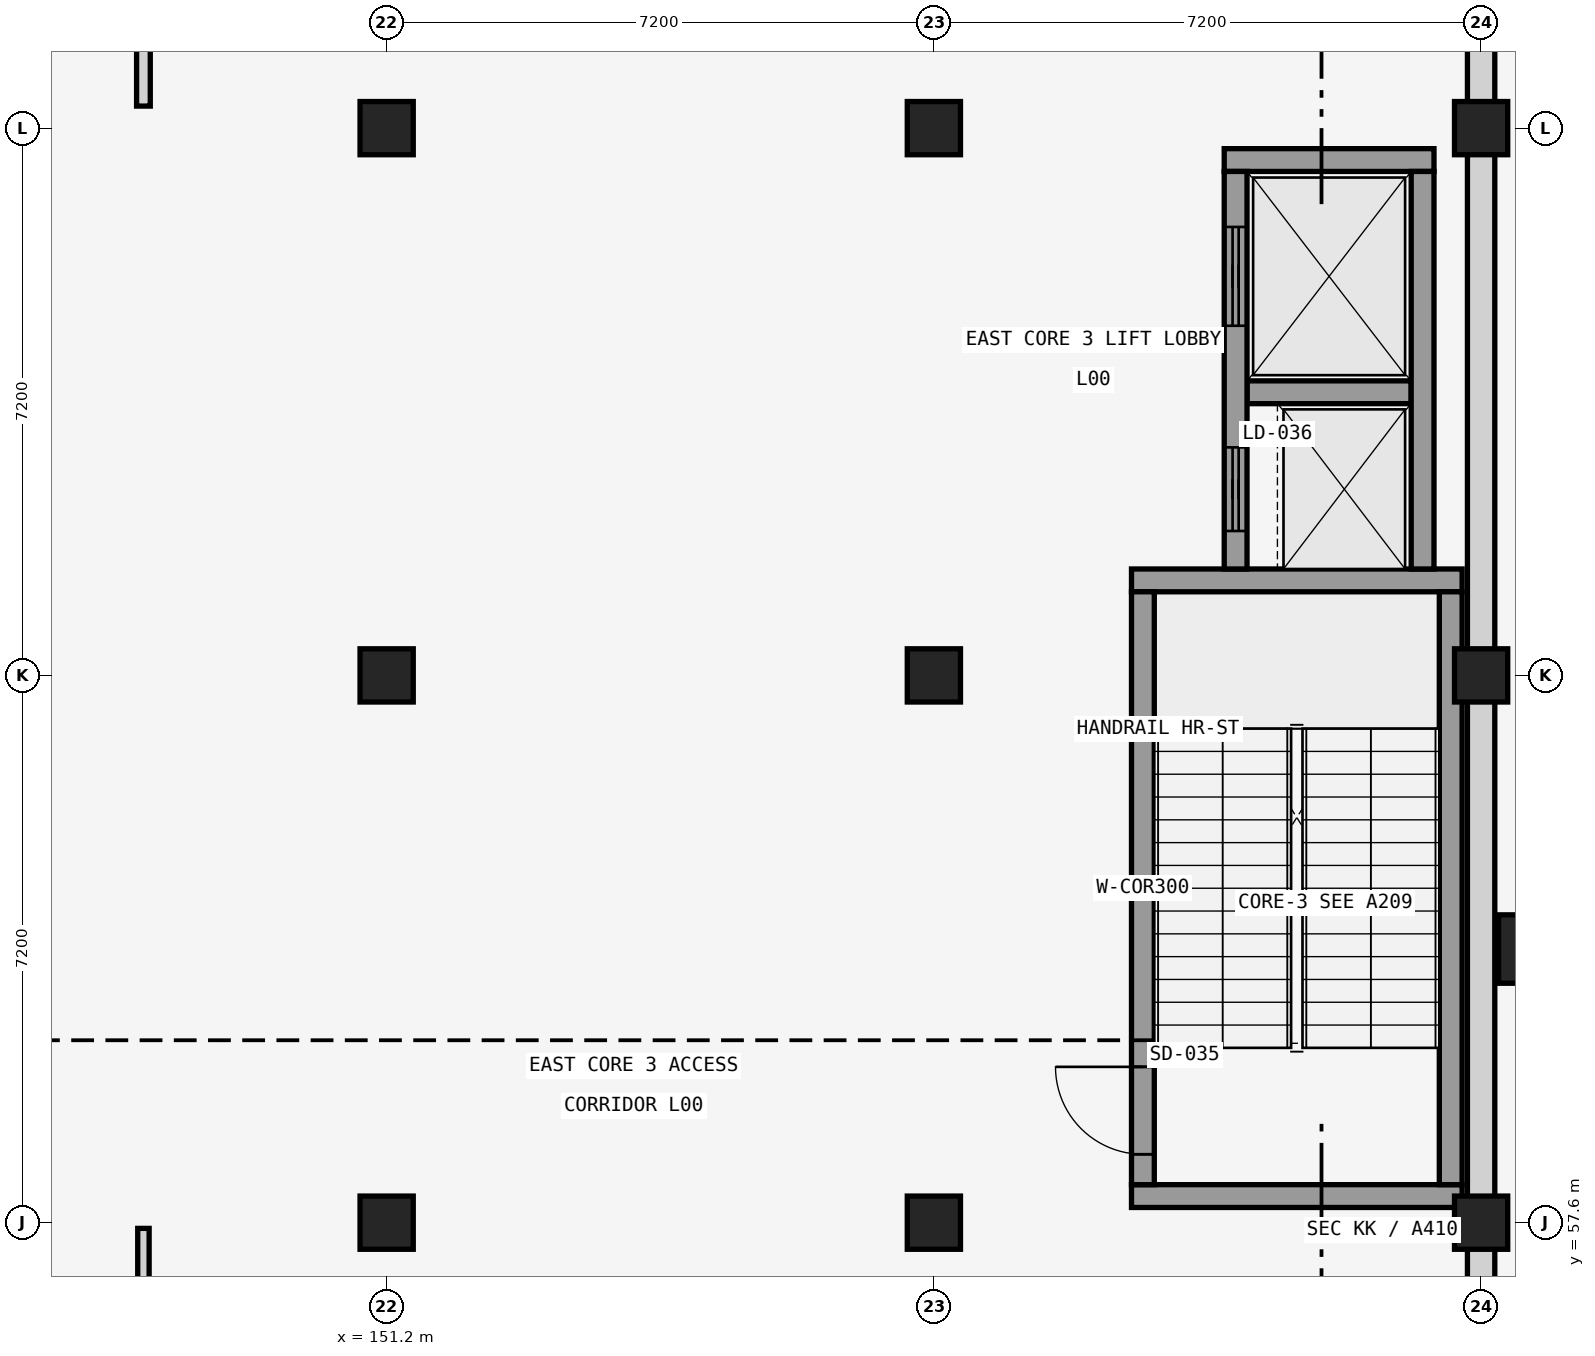
"""IFC4 building model, lengths in metres.
Left out: names, types, materials, properties, quantities, classifications, styles, units other than length and angle.
Written with IfcOpenShell. Run it as: python <this file> out.ifc"""

import sys

from ifc_helpers import new_model, si_unit, direction, frame, frame_2d, origin, origin_2d, place, context, subcontext, project, spatial, rectangle, extrude, element, fill, save


model = new_model("IFC4")
c1 = context("Model", 3, precision=1e-05, world=origin(), true_north=direction((0.0, 1.0)))
c2 = subcontext(c1, "Body", "Model", "MODEL_VIEW")
j1 = project(units=[si_unit("LENGTHUNIT", "METRE"), si_unit("PLANEANGLEUNIT", "RADIAN")], contexts=[c1])
p1 = place(None, origin())
s1 = spatial("IfcSite", under=j1, at=p1, CompositionType="ELEMENT")
p2 = place(p1, origin())
s2 = spatial("IfcBuilding", under=s1, at=p2, CompositionType="ELEMENT")
p3 = place(p2, origin())
s3 = spatial("IfcBuildingStorey", under=s2, at=p3, CompositionType="ELEMENT", Elevation=0.0)
for number, where, z_axis, x_axis in (
    (1, (151.2, 57.6, 0.0), (0.0, 0.0, 1.0), (1.0, 0.0, 0.0)),
    (2, (151.2, 64.8, 0.0), (0.0, 0.0, 1.0), (1.0, 0.0, 0.0)),
    (3, (151.2, 72.0, 0.0), (0.0, 0.0, 1.0), (1.0, 0.0, 0.0)),
    (4, (158.4, 57.6, 0.0), (0.0, 0.0, 1.0), (1.0, 0.0, 0.0)),
    (5, (158.4, 64.8, 0.0), (0.0, 0.0, 1.0), (1.0, 0.0, 0.0)),
    (6, (158.4, 72.0, 0.0), (0.0, 0.0, 1.0), (1.0, 0.0, 0.0)),
    (7, (165.6, 57.6, 0.0), (0.0, 0.0, 1.0), (1.0, 0.0, 0.0)),
    (8, (165.6, 64.8, 0.0), (0.0, 0.0, 1.0), (1.0, 0.0, 0.0)),
    (9, (165.6, 72.0, 0.0), (0.0, 0.0, 1.0), (1.0, 0.0, 0.0)),
):
    element("IfcColumn", number, at=place(p3, frame(where, z_axis=z_axis, x_axis=x_axis)), inside=s3, PredefinedType="COLUMN", context=c2, shape_type="SweptSolid", body=[
        extrude(rectangle(XDim=0.7, YDim=0.7, at=origin_2d()), origin(), (0.0, 0.0, 1.0), 4.8),
    ])
p4 = place(p3, frame((166.08, 61.2, 0.0), z_axis=(0.0, 0.0, 1.0), x_axis=(1.0, 0.0, 0.0)))
e10 = element("IfcColumn", 10, at=p4, inside=s3, PredefinedType="PILASTER", context=c2, shape_type="SweptSolid", body=[
    extrude(rectangle(XDim=0.5, YDim=0.9, at=origin_2d()), origin(), (0.0, 0.0, 1.0), 4.8),
])
p5 = place(p3, frame((165.6, 50.74, 0.0), z_axis=(0.0, 0.0, 1.0), x_axis=(0.0, 1.0, 0.0)))
e11 = element("IfcWall", 11, at=p5, inside=s3, PredefinedType="SOLIDWALL", context=c2, shape_type="SweptSolid", body=[
    extrude(rectangle(XDim=6.52, YDim=0.36, at=frame_2d((3.26, 0.0))), origin(), (0.0, 0.0, 1.0), 3.75),
])
p6 = place(p5, frame((2.41, 0.0, 0.0)))
e12 = element("IfcOpeningElement", 12, at=p6, cuts=e11, PredefinedType="OPENING", context=c2, shape_type="SweptSolid", body=[
    extrude(rectangle(XDim=1.7, YDim=2.3, at=frame_2d((0.85, 1.15))), frame((0.0, 0.19, 0.0), z_axis=(0.0, -1.0, 0.0), x_axis=(1.0, 0.0, 0.0)), (0.0, 0.0, 1.0), 0.38),
])
for number, where, z_axis, x_axis in (
    (13, (165.6, 57.94, 0.0), (0.0, 0.0, 1.0), (0.0, 1.0, 0.0)),
    (14, (165.6, 65.14, 0.0), (0.0, 0.0, 1.0), (0.0, 1.0, 0.0)),
):
    element("IfcWall", number, at=place(p3, frame(where, z_axis=z_axis, x_axis=x_axis)), inside=s3, PredefinedType="SOLIDWALL", context=c2, shape_type="SweptSolid", body=[
        extrude(rectangle(XDim=6.52, YDim=0.36, at=frame_2d((3.26, 0.0))), origin(), (0.0, 0.0, 1.0), 3.75),
    ])
p7 = place(p3, frame((165.6, 72.34, 0.0), z_axis=(0.0, 0.0, 1.0), x_axis=(0.0, 1.0, 0.0)))
e15 = element("IfcWall", 15, at=p7, inside=s3, PredefinedType="SOLIDWALL", context=c2, shape_type="SweptSolid", body=[
    extrude(rectangle(XDim=6.52, YDim=0.36, at=frame_2d((3.26, 0.0))), origin(), (0.0, 0.0, 1.0), 3.75),
])
p8 = place(p7, frame((1.91, 0.0, 0.95)))
e16 = element("IfcOpeningElement", 16, at=p8, cuts=e15, PredefinedType="OPENING", context=c2, shape_type="SweptSolid", body=[
    extrude(rectangle(XDim=2.7, YDim=1.8, at=frame_2d((1.35, 0.9))), frame((0.0, 0.19, 0.0), z_axis=(0.0, -1.0, 0.0), x_axis=(1.0, 0.0, 0.0)), (0.0, 0.0, 1.0), 0.38),
])
for number, where, z_axis, x_axis in (
    (17, (161.0, 57.95, 0.0), (0.0, 0.0, 1.0), (1.0, 0.0, 0.0)),
    (18, (161.0, 66.05, 0.0), (0.0, 0.0, 1.0), (1.0, 0.0, 0.0)),
):
    element("IfcWall", number, at=place(p3, frame(where, z_axis=z_axis, x_axis=x_axis)), inside=s3, PredefinedType="SHEAR", context=c2, shape_type="SweptSolid", body=[
        extrude(rectangle(XDim=4.35, YDim=0.3, at=frame_2d((2.175, 0.0))), origin(), (0.0, 0.0, 1.0), 4.45),
    ])
p9 = place(p3, frame((161.15, 58.1, 0.0), z_axis=(0.0, 0.0, 1.0), x_axis=(0.0, 1.0, 0.0)))
e19 = element("IfcWall", 19, at=p9, inside=s3, PredefinedType="SHEAR", context=c2, shape_type="SweptSolid", body=[
    extrude(rectangle(XDim=7.8, YDim=0.3, at=frame_2d((3.9, 0.0))), origin(), (0.0, 0.0, 1.0), 4.45),
])
p10 = place(p9, frame((0.4, 0.0, 0.0)))
e20 = element("IfcOpeningElement", 20, at=p10, cuts=e19, PredefinedType="OPENING", context=c2, shape_type="SweptSolid", body=[
    extrude(rectangle(XDim=1.15, YDim=2.2, at=frame_2d((0.575, 1.1))), frame((0.0, 0.16, 0.0), z_axis=(0.0, -1.0, 0.0), x_axis=(1.0, 0.0, 0.0)), (0.0, 0.0, 1.0), 0.32),
])
p11 = place(p3, frame((165.2, 58.1, 0.0), z_axis=(0.0, 0.0, 1.0), x_axis=(0.0, 1.0, 0.0)))
e21 = element("IfcWall", 21, at=p11, inside=s3, PredefinedType="SHEAR", context=c2, shape_type="SweptSolid", body=[
    extrude(rectangle(XDim=7.8, YDim=0.3, at=frame_2d((3.9, 0.0))), origin(), (0.0, 0.0, 1.0), 4.45),
])
p12 = place(p3, frame((162.22, 71.58, 0.0), z_axis=(0.0, 0.0, 1.0), x_axis=(1.0, 0.0, 0.0)))
e22 = element("IfcWall", 22, at=p12, inside=s3, PredefinedType="SHEAR", context=c2, shape_type="SweptSolid", body=[
    extrude(rectangle(XDim=2.76, YDim=0.3, at=frame_2d((1.38, 0.0))), origin(), (0.0, 0.0, 1.0), 4.45),
])
p13 = place(p3, frame((162.52, 68.525, 0.0), z_axis=(0.0, 0.0, 1.0), x_axis=(1.0, 0.0, 0.0)))
e23 = element("IfcWall", 23, at=p13, inside=s3, PredefinedType="SHEAR", context=c2, shape_type="SweptSolid", body=[
    extrude(rectangle(XDim=2.16, YDim=0.3, at=frame_2d((1.08, 0.0))), origin(), (0.0, 0.0, 1.0), 4.45),
])
p14 = place(p3, frame((162.37, 66.2, 0.0), z_axis=(0.0, 0.0, 1.0), x_axis=(0.0, 1.0, 0.0)))
e24 = element("IfcWall", 24, at=p14, inside=s3, PredefinedType="SHEAR", context=c2, shape_type="SweptSolid", body=[
    extrude(rectangle(XDim=5.23, YDim=0.3, at=frame_2d((2.615, 0.0))), origin(), (0.0, 0.0, 1.0), 4.45),
])
p15 = place(p14, frame((0.5, 0.0, 0.0)))
e25 = element("IfcOpeningElement", 25, at=p15, cuts=e24, PredefinedType="OPENING", context=c2, shape_type="SweptSolid", body=[
    extrude(rectangle(XDim=1.1, YDim=2.2, at=frame_2d((0.55, 1.1))), frame((0.0, 0.16, 0.0), z_axis=(0.0, -1.0, 0.0), x_axis=(1.0, 0.0, 0.0)), (0.0, 0.0, 1.0), 0.32),
])
p16 = place(p14, frame((3.2, 0.0, 0.0)))
e26 = element("IfcOpeningElement", 26, at=p16, cuts=e24, PredefinedType="OPENING", context=c2, shape_type="SweptSolid", body=[
    extrude(rectangle(XDim=1.3, YDim=2.2, at=frame_2d((0.65, 1.1))), frame((0.0, 0.16, 0.0), z_axis=(0.0, -1.0, 0.0), x_axis=(1.0, 0.0, 0.0)), (0.0, 0.0, 1.0), 0.32),
])
p17 = place(p3, frame((164.83, 66.2, 0.0), z_axis=(0.0, 0.0, 1.0), x_axis=(0.0, 1.0, 0.0)))
e27 = element("IfcWall", 27, at=p17, inside=s3, PredefinedType="SHEAR", context=c2, shape_type="SweptSolid", body=[
    extrude(rectangle(XDim=5.23, YDim=0.3, at=frame_2d((2.615, 0.0))), origin(), (0.0, 0.0, 1.0), 4.45),
])
p18 = place(p3, frame((148.0, 36.275, 0.0), z_axis=(0.0, 0.0, 1.0), x_axis=(0.0, 1.0, 0.0)))
e28 = element("IfcWall", 28, at=p18, inside=s3, PredefinedType="PARTITIONING", context=c2, shape_type="SweptSolid", body=[
    extrude(rectangle(XDim=21.25, YDim=0.15, at=frame_2d((10.625, 0.0))), origin(), (0.0, 0.0, 1.0), 3.75),
])
p19 = place(p18, frame((9.925, 0.0, 0.0)))
e29 = element("IfcOpeningElement", 29, at=p19, cuts=e28, PredefinedType="OPENING", context=c2, shape_type="SweptSolid", body=[
    extrude(rectangle(XDim=1.4, YDim=2.2, at=frame_2d((0.7, 1.1))), frame((0.0, 0.085, 0.0), z_axis=(0.0, -1.0, 0.0), x_axis=(1.0, 0.0, 0.0)), (0.0, 0.0, 1.0), 0.17),
])
p20 = place(p3, frame((148.0, 72.29, 0.0), z_axis=(0.0, 0.0, 1.0), x_axis=(0.0, 1.0, 0.0)))
e30 = element("IfcWall", 30, at=p20, inside=s3, PredefinedType="PARTITIONING", context=c2, shape_type="SweptSolid", body=[
    extrude(rectangle(XDim=21.22, YDim=0.18, at=frame_2d((10.61, 0.0))), origin(), (0.0, 0.0, 1.0), 3.75),
])
p21 = place(p20, frame((9.86, 0.0, 0.0)))
e31 = element("IfcOpeningElement", 31, at=p21, cuts=e30, PredefinedType="OPENING", context=c2, shape_type="SweptSolid", body=[
    extrude(rectangle(XDim=1.5, YDim=2.2, at=frame_2d((0.75, 1.1))), frame((0.0, 0.1, 0.0), z_axis=(0.0, -1.0, 0.0), x_axis=(1.0, 0.0, 0.0)), (0.0, 0.0, 1.0), 0.2),
])
p22 = place(p10, frame((1.15, 0.0, 0.0), z_axis=(0.0, 0.0, 1.0), x_axis=(-1.0, 0.0, 0.0)))
e32 = element("IfcDoor", 32, at=p22, inside=s3, OperationType="SINGLE_SWING_RIGHT", PredefinedType="DOOR", context=c2, shape_type="SweptSolid", body=[
    extrude(rectangle(XDim=1.15, YDim=2.2, at=frame_2d((0.575, 1.1))), frame((0.0, 0.025, 0.0), z_axis=(0.0, -1.0, 0.0), x_axis=(1.0, 0.0, 0.0)), (0.0, 0.0, 1.0), 0.05),
])
fill(e20, e32)
p23 = place(p15, origin())
e33 = element("IfcDoor", 33, at=p23, inside=s3, OperationType="SLIDING_TO_LEFT", PredefinedType="DOOR", context=c2, shape_type="SweptSolid", body=[
    extrude(rectangle(XDim=1.1, YDim=2.2, at=frame_2d((0.55, 1.1))), frame((0.0, 0.025, 0.0), z_axis=(0.0, -1.0, 0.0), x_axis=(1.0, 0.0, 0.0)), (0.0, 0.0, 1.0), 0.05),
])
fill(e25, e33)
p24 = place(p16, origin())
e34 = element("IfcDoor", 34, at=p24, inside=s3, OperationType="SLIDING_TO_LEFT", PredefinedType="DOOR", context=c2, shape_type="SweptSolid", body=[
    extrude(rectangle(XDim=1.3, YDim=2.2, at=frame_2d((0.65, 1.1))), frame((0.0, 0.025, 0.0), z_axis=(0.0, -1.0, 0.0), x_axis=(1.0, 0.0, 0.0)), (0.0, 0.0, 1.0), 0.05),
])
fill(e26, e34)
save(model, sys.argv[1])
